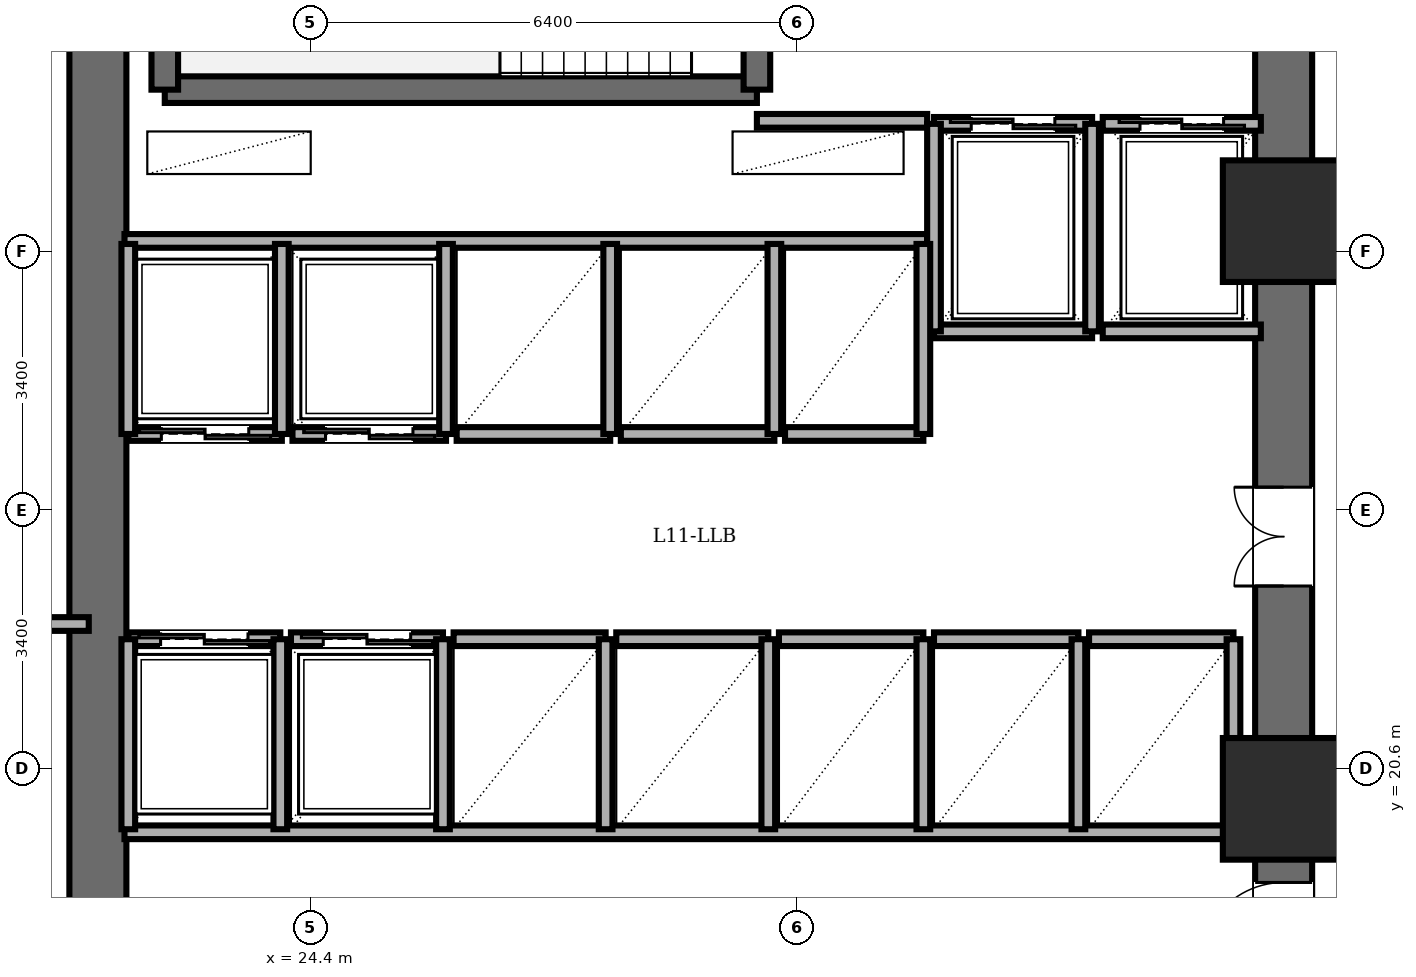
"""IFC4 building model, lengths in metres.
Left out: names, types, materials, properties, quantities, classifications, styles, units other than length and angle.
Written with IfcOpenShell. Run it as: python <this file> out.ifc"""

import sys

from ifc_helpers import new_model, si_unit, direction, frame, frame_2d, origin, origin_2d, place, context, subcontext, project, spatial, rectangle, extrude, element, fill, save


model = new_model("IFC4")
c1 = context("Model", 3, precision=1e-05, world=origin(), true_north=direction((0.0, 1.0)))
c2 = subcontext(c1, "Body", "Model", "MODEL_VIEW")
j1 = project(units=[si_unit("LENGTHUNIT", "METRE"), si_unit("PLANEANGLEUNIT", "RADIAN")], contexts=[c1])
p1 = place(None, origin())
s1 = spatial("IfcSite", under=j1, at=p1, CompositionType="ELEMENT")
p2 = place(p1, origin())
s2 = spatial("IfcBuilding", under=s1, at=p2, CompositionType="ELEMENT")
p3 = place(p2, frame((0.0, 0.0, 43.2)))
s3 = spatial("IfcBuildingStorey", under=s2, at=p3, CompositionType="ELEMENT", Elevation=43.2)
for number, where, z_axis, x_axis in (
    (1, (37.2, 20.2, 0.0), (0.0, 0.0, 1.0), (1.0, 0.0, 0.0)),
    (2, (37.2, 27.8, 0.0), (0.0, 0.0, 1.0), (1.0, 0.0, 0.0)),
):
    element("IfcColumn", number, at=place(p3, frame(where, z_axis=z_axis, x_axis=x_axis)), inside=s3, PredefinedType="COLUMN", context=c2, shape_type="SweptSolid", body=[
        extrude(rectangle(XDim=1.6, YDim=1.6, at=origin_2d()), origin(), (0.0, 0.0, 1.0), 3.6),
    ])
p4 = place(p3, frame((21.6, 14.4, 0.0), z_axis=(0.0, 0.0, 1.0), x_axis=(0.0, 1.0, 0.0)))
e3 = element("IfcWall", 3, at=p4, inside=s3, PredefinedType="SHEAR", context=c2, shape_type="SweptSolid", body=[
    extrude(rectangle(XDim=19.2, YDim=0.75, at=frame_2d((9.6, 0.0))), origin(), (0.0, 0.0, 1.0), 3.4),
])
p5 = place(p3, frame((37.2, 14.4, 0.0), z_axis=(0.0, 0.0, 1.0), x_axis=(0.0, 1.0, 0.0)))
e4 = element("IfcWall", 4, at=p5, inside=s3, PredefinedType="SHEAR", context=c2, shape_type="SweptSolid", body=[
    extrude(rectangle(XDim=19.2, YDim=0.75, at=frame_2d((9.6, 0.0))), origin(), (0.0, 0.0, 1.0), 3.4),
])
p6 = place(p5, frame((15.8, 0.0, 0.0)))
e5 = element("IfcOpeningElement", 5, at=p6, cuts=e4, PredefinedType="OPENING", context=c2, shape_type="SweptSolid", body=[
    extrude(rectangle(XDim=1.15, YDim=2.15, at=frame_2d((0.575, 1.075))), frame((0.0, 0.385, 0.0), z_axis=(0.0, -1.0, 0.0), x_axis=(1.0, 0.0, 0.0)), (0.0, 0.0, 1.0), 0.77),
])
p7 = place(p5, frame((3.6, 0.0, 0.0)))
e6 = element("IfcOpeningElement", 6, at=p7, cuts=e4, PredefinedType="OPENING", context=c2, shape_type="SweptSolid", body=[
    extrude(rectangle(XDim=1.1, YDim=2.15, at=frame_2d((0.55, 1.075))), frame((0.0, 0.385, 0.0), z_axis=(0.0, -1.0, 0.0), x_axis=(1.0, 0.0, 0.0)), (0.0, 0.0, 1.0), 0.77),
])
p8 = place(p5, frame((8.6, 0.0, 0.0)))
e7 = element("IfcOpeningElement", 7, at=p8, cuts=e4, PredefinedType="OPENING", context=c2, shape_type="SweptSolid", body=[
    extrude(rectangle(XDim=1.3, YDim=2.2, at=frame_2d((0.65, 1.1))), frame((0.0, 0.385, 0.0), z_axis=(0.0, -1.0, 0.0), x_axis=(1.0, 0.0, 0.0)), (0.0, 0.0, 1.0), 0.77),
])
p9 = place(p3, frame((22.48, 29.53, 0.0), z_axis=(0.0, 0.0, 1.0), x_axis=(1.0, 0.0, 0.0)))
e8 = element("IfcWall", 8, at=p9, inside=s3, PredefinedType="SOLIDWALL", context=c2, shape_type="SweptSolid", body=[
    extrude(rectangle(XDim=7.79, YDim=0.35, at=frame_2d((3.895, 0.0))), origin(), (0.0, 0.0, 1.0), 3.4),
])
p10 = place(p3, frame((22.48, 29.53, 0.0), z_axis=(0.0, 0.0, 1.0), x_axis=(0.0, 1.0, 0.0)))
e9 = element("IfcWall", 9, at=p10, inside=s3, PredefinedType="SOLIDWALL", context=c2, shape_type="SweptSolid", body=[
    extrude(rectangle(XDim=3.58, YDim=0.35, at=frame_2d((1.79, 0.0))), origin(), (0.0, 0.0, 1.0), 3.4),
])
p11 = place(p3, frame((30.27, 29.53, 0.0), z_axis=(0.0, 0.0, 1.0), x_axis=(0.0, 1.0, 0.0)))
e10 = element("IfcWall", 10, at=p11, inside=s3, PredefinedType="SOLIDWALL", context=c2, shape_type="SweptSolid", body=[
    extrude(rectangle(XDim=3.58, YDim=0.35, at=frame_2d((1.79, 0.0))), origin(), (0.0, 0.0, 1.0), 3.4),
])
p12 = place(p11, frame((1.25, 0.0, 0.0)))
e11 = element("IfcOpeningElement", 11, at=p12, cuts=e10, PredefinedType="OPENING", context=c2, shape_type="SweptSolid", body=[
    extrude(rectangle(XDim=1.1, YDim=2.15, at=frame_2d((0.55, 1.075))), frame((0.0, 0.185, 0.0), z_axis=(0.0, -1.0, 0.0), x_axis=(1.0, 0.0, 0.0)), (0.0, 0.0, 1.0), 0.37),
])
p13 = place(p3, frame((30.27, 29.12, 0.0), z_axis=(0.0, 0.0, 1.0), x_axis=(1.0, 0.0, 0.0)))
e12 = element("IfcWall", 12, at=p13, inside=s3, PredefinedType="PARTITIONING", context=c2, shape_type="SweptSolid", body=[
    extrude(rectangle(XDim=2.24, YDim=0.18, at=frame_2d((1.12, 0.0))), origin(), (0.0, 0.0, 1.0), 3.4),
])
p14 = place(p3, frame((21.95, 27.54, 0.0), z_axis=(0.0, 0.0, 1.0), x_axis=(1.0, 0.0, 0.0)))
e13 = element("IfcWall", 13, at=p14, inside=s3, PredefinedType="PARTITIONING", context=c2, shape_type="SweptSolid", body=[
    extrude(rectangle(XDim=10.56, YDim=0.18, at=frame_2d((5.28, 0.0))), origin(), (0.0, 0.0, 1.0), 3.4),
])
p15 = place(p3, frame((21.95, 19.76, 0.0), z_axis=(0.0, 0.0, 1.0), x_axis=(1.0, 0.0, 0.0)))
e14 = element("IfcWall", 14, at=p15, inside=s3, PredefinedType="PARTITIONING", context=c2, shape_type="SweptSolid", body=[
    extrude(rectangle(XDim=14.87, YDim=0.18, at=frame_2d((7.435, 0.0))), origin(), (0.0, 0.0, 1.0), 3.4),
])
p16 = place(p3, frame((32.6, 29.08, 0.0), z_axis=(0.0, 0.0, 1.0), x_axis=(1.0, 0.0, 0.0)))
e15 = element("IfcWall", 15, at=p16, inside=s3, PredefinedType="PARTITIONING", context=c2, shape_type="SweptSolid", body=[
    extrude(rectangle(XDim=2.08, YDim=0.18, at=frame_2d((1.04, 0.0))), origin(), (0.0, 0.0, 1.0), 3.4),
])
p17 = place(p16, frame((0.49, 0.0, 0.0)))
e16 = element("IfcOpeningElement", 16, at=p17, cuts=e15, PredefinedType="OPENING", context=c2, shape_type="SweptSolid", body=[
    extrude(rectangle(XDim=1.1, YDim=2.2, at=frame_2d((0.55, 1.1))), frame((0.0, 0.1, 0.0), z_axis=(0.0, -1.0, 0.0), x_axis=(1.0, 0.0, 0.0)), (0.0, 0.0, 1.0), 0.2),
])
p18 = place(p3, frame((34.68, 26.35, 0.0), z_axis=(0.0, 0.0, 1.0), x_axis=(-1.0, 0.0, 0.0)))
e17 = element("IfcWall", 17, at=p18, inside=s3, PredefinedType="PARTITIONING", context=c2, shape_type="SweptSolid", body=[
    extrude(rectangle(XDim=2.08, YDim=0.18, at=frame_2d((1.04, 0.0))), origin(), (0.0, 0.0, 1.0), 3.4),
])
for number, where, z_axis, x_axis in (
    (18, (34.68, 26.35, 0.0), (0.0, 0.0, 1.0), (0.0, 1.0, 0.0)),
    (19, (32.6, 29.08, 0.0), (0.0, 0.0, 1.0), (0.0, -1.0, 0.0)),
):
    element("IfcWall", number, at=place(p3, frame(where, z_axis=z_axis, x_axis=x_axis)), inside=s3, PredefinedType="PARTITIONING", context=c2, shape_type="SweptSolid", body=[
        extrude(rectangle(XDim=2.73, YDim=0.18, at=frame_2d((1.365, 0.0))), origin(), (0.0, 0.0, 1.0), 3.4),
    ])
p19 = place(p3, frame((34.82, 29.08, 0.0), z_axis=(0.0, 0.0, 1.0), x_axis=(1.0, 0.0, 0.0)))
e20 = element("IfcWall", 20, at=p19, inside=s3, PredefinedType="PARTITIONING", context=c2, shape_type="SweptSolid", body=[
    extrude(rectangle(XDim=2.08, YDim=0.18, at=frame_2d((1.04, 0.0))), origin(), (0.0, 0.0, 1.0), 3.4),
])
p20 = place(p19, frame((0.49, 0.0, 0.0)))
e21 = element("IfcOpeningElement", 21, at=p20, cuts=e20, PredefinedType="OPENING", context=c2, shape_type="SweptSolid", body=[
    extrude(rectangle(XDim=1.1, YDim=2.2, at=frame_2d((0.55, 1.1))), frame((0.0, 0.1, 0.0), z_axis=(0.0, -1.0, 0.0), x_axis=(1.0, 0.0, 0.0)), (0.0, 0.0, 1.0), 0.2),
])
p21 = place(p3, frame((36.9, 26.35, 0.0), z_axis=(0.0, 0.0, 1.0), x_axis=(-1.0, 0.0, 0.0)))
e22 = element("IfcWall", 22, at=p21, inside=s3, PredefinedType="PARTITIONING", context=c2, shape_type="SweptSolid", body=[
    extrude(rectangle(XDim=2.08, YDim=0.18, at=frame_2d((1.04, 0.0))), origin(), (0.0, 0.0, 1.0), 3.4),
])
p22 = place(p3, frame((24.02, 25.0, 0.0), z_axis=(0.0, 0.0, 1.0), x_axis=(-1.0, 0.0, 0.0)))
e23 = element("IfcWall", 23, at=p22, inside=s3, PredefinedType="PARTITIONING", context=c2, shape_type="SweptSolid", body=[
    extrude(rectangle(XDim=2.02, YDim=0.18, at=frame_2d((1.01, 0.0))), origin(), (0.0, 0.0, 1.0), 3.4),
])
p23 = place(p22, frame((0.435, 0.0, 0.0)))
e24 = element("IfcOpeningElement", 24, at=p23, cuts=e23, PredefinedType="OPENING", context=c2, shape_type="SweptSolid", body=[
    extrude(rectangle(XDim=1.15, YDim=2.2, at=frame_2d((0.575, 1.1))), frame((0.0, 0.1, 0.0), z_axis=(0.0, -1.0, 0.0), x_axis=(1.0, 0.0, 0.0)), (0.0, 0.0, 1.0), 0.2),
])
for number, where, z_axis, x_axis in (
    (25, (24.02, 25.0, 0.0), (0.0, 0.0, 1.0), (0.0, 1.0, 0.0)),
    (26, (22.0, 27.5, 0.0), (0.0, 0.0, 1.0), (0.0, -1.0, 0.0)),
):
    element("IfcWall", number, at=place(p3, frame(where, z_axis=z_axis, x_axis=x_axis)), inside=s3, PredefinedType="PARTITIONING", context=c2, shape_type="SweptSolid", body=[
        extrude(rectangle(XDim=2.5, YDim=0.18, at=frame_2d((1.25, 0.0))), origin(), (0.0, 0.0, 1.0), 3.4),
    ])
p24 = place(p3, frame((26.18, 25.0, 0.0), z_axis=(0.0, 0.0, 1.0), x_axis=(-1.0, 0.0, 0.0)))
e27 = element("IfcWall", 27, at=p24, inside=s3, PredefinedType="PARTITIONING", context=c2, shape_type="SweptSolid", body=[
    extrude(rectangle(XDim=2.02, YDim=0.18, at=frame_2d((1.01, 0.0))), origin(), (0.0, 0.0, 1.0), 3.4),
])
p25 = place(p24, frame((0.435, 0.0, 0.0)))
e28 = element("IfcOpeningElement", 28, at=p25, cuts=e27, PredefinedType="OPENING", context=c2, shape_type="SweptSolid", body=[
    extrude(rectangle(XDim=1.15, YDim=2.2, at=frame_2d((0.575, 1.1))), frame((0.0, 0.1, 0.0), z_axis=(0.0, -1.0, 0.0), x_axis=(1.0, 0.0, 0.0)), (0.0, 0.0, 1.0), 0.2),
])
p26 = place(p3, frame((26.18, 25.0, 0.0), z_axis=(0.0, 0.0, 1.0), x_axis=(0.0, 1.0, 0.0)))
e29 = element("IfcWall", 29, at=p26, inside=s3, PredefinedType="PARTITIONING", context=c2, shape_type="SweptSolid", body=[
    extrude(rectangle(XDim=2.5, YDim=0.18, at=frame_2d((1.25, 0.0))), origin(), (0.0, 0.0, 1.0), 3.4),
])
p27 = place(p3, frame((22.0, 22.3, 0.0), z_axis=(0.0, 0.0, 1.0), x_axis=(1.0, 0.0, 0.0)))
e30 = element("IfcWall", 30, at=p27, inside=s3, PredefinedType="PARTITIONING", context=c2, shape_type="SweptSolid", body=[
    extrude(rectangle(XDim=2.0, YDim=0.18, at=frame_2d((1.0, 0.0))), origin(), (0.0, 0.0, 1.0), 3.4),
])
p28 = place(p27, frame((0.425, 0.0, 0.0)))
e31 = element("IfcOpeningElement", 31, at=p28, cuts=e30, PredefinedType="OPENING", context=c2, shape_type="SweptSolid", body=[
    extrude(rectangle(XDim=1.15, YDim=2.2, at=frame_2d((0.575, 1.1))), frame((0.0, 0.1, 0.0), z_axis=(0.0, -1.0, 0.0), x_axis=(1.0, 0.0, 0.0)), (0.0, 0.0, 1.0), 0.2),
])
for number, where, z_axis, x_axis in (
    (32, (24.0, 19.8, 0.0), (0.0, 0.0, 1.0), (0.0, 1.0, 0.0)),
    (33, (22.0, 22.3, 0.0), (0.0, 0.0, 1.0), (0.0, -1.0, 0.0)),
):
    element("IfcWall", number, at=place(p3, frame(where, z_axis=z_axis, x_axis=x_axis)), inside=s3, PredefinedType="PARTITIONING", context=c2, shape_type="SweptSolid", body=[
        extrude(rectangle(XDim=2.5, YDim=0.18, at=frame_2d((1.25, 0.0))), origin(), (0.0, 0.0, 1.0), 3.4),
    ])
p29 = place(p3, frame((24.14, 22.3, 0.0), z_axis=(0.0, 0.0, 1.0), x_axis=(1.0, 0.0, 0.0)))
e34 = element("IfcWall", 34, at=p29, inside=s3, PredefinedType="PARTITIONING", context=c2, shape_type="SweptSolid", body=[
    extrude(rectangle(XDim=2.0, YDim=0.18, at=frame_2d((1.0, 0.0))), origin(), (0.0, 0.0, 1.0), 3.4),
])
p30 = place(p29, frame((0.425, 0.0, 0.0)))
e35 = element("IfcOpeningElement", 35, at=p30, cuts=e34, PredefinedType="OPENING", context=c2, shape_type="SweptSolid", body=[
    extrude(rectangle(XDim=1.15, YDim=2.2, at=frame_2d((0.575, 1.1))), frame((0.0, 0.1, 0.0), z_axis=(0.0, -1.0, 0.0), x_axis=(1.0, 0.0, 0.0)), (0.0, 0.0, 1.0), 0.2),
])
p31 = place(p3, frame((26.14, 19.8, 0.0), z_axis=(0.0, 0.0, 1.0), x_axis=(0.0, 1.0, 0.0)))
e36 = element("IfcWall", 36, at=p31, inside=s3, PredefinedType="PARTITIONING", context=c2, shape_type="SweptSolid", body=[
    extrude(rectangle(XDim=2.5, YDim=0.18, at=frame_2d((1.25, 0.0))), origin(), (0.0, 0.0, 1.0), 3.4),
])
p32 = place(p3, frame((28.34, 25.0, 0.0), z_axis=(0.0, 0.0, 1.0), x_axis=(-1.0, 0.0, 0.0)))
e37 = element("IfcWall", 37, at=p32, inside=s3, PredefinedType="PARTITIONING", context=c2, shape_type="SweptSolid", body=[
    extrude(rectangle(XDim=2.02, YDim=0.18, at=frame_2d((1.01, 0.0))), origin(), (0.0, 0.0, 1.0), 3.4),
])
p33 = place(p3, frame((28.34, 25.0, 0.0), z_axis=(0.0, 0.0, 1.0), x_axis=(0.0, 1.0, 0.0)))
e38 = element("IfcWall", 38, at=p33, inside=s3, PredefinedType="PARTITIONING", context=c2, shape_type="SweptSolid", body=[
    extrude(rectangle(XDim=2.5, YDim=0.18, at=frame_2d((1.25, 0.0))), origin(), (0.0, 0.0, 1.0), 3.4),
])
p34 = place(p3, frame((30.5, 25.0, 0.0), z_axis=(0.0, 0.0, 1.0), x_axis=(-1.0, 0.0, 0.0)))
e39 = element("IfcWall", 39, at=p34, inside=s3, PredefinedType="PARTITIONING", context=c2, shape_type="SweptSolid", body=[
    extrude(rectangle(XDim=2.02, YDim=0.18, at=frame_2d((1.01, 0.0))), origin(), (0.0, 0.0, 1.0), 3.4),
])
p35 = place(p3, frame((30.5, 25.0, 0.0), z_axis=(0.0, 0.0, 1.0), x_axis=(0.0, 1.0, 0.0)))
e40 = element("IfcWall", 40, at=p35, inside=s3, PredefinedType="PARTITIONING", context=c2, shape_type="SweptSolid", body=[
    extrude(rectangle(XDim=2.5, YDim=0.18, at=frame_2d((1.25, 0.0))), origin(), (0.0, 0.0, 1.0), 3.4),
])
p36 = place(p3, frame((26.28, 22.3, 0.0), z_axis=(0.0, 0.0, 1.0), x_axis=(1.0, 0.0, 0.0)))
e41 = element("IfcWall", 41, at=p36, inside=s3, PredefinedType="PARTITIONING", context=c2, shape_type="SweptSolid", body=[
    extrude(rectangle(XDim=2.0, YDim=0.18, at=frame_2d((1.0, 0.0))), origin(), (0.0, 0.0, 1.0), 3.4),
])
p37 = place(p3, frame((28.28, 19.8, 0.0), z_axis=(0.0, 0.0, 1.0), x_axis=(0.0, 1.0, 0.0)))
e42 = element("IfcWall", 42, at=p37, inside=s3, PredefinedType="PARTITIONING", context=c2, shape_type="SweptSolid", body=[
    extrude(rectangle(XDim=2.5, YDim=0.18, at=frame_2d((1.25, 0.0))), origin(), (0.0, 0.0, 1.0), 3.4),
])
p38 = place(p3, frame((28.42, 22.3, 0.0), z_axis=(0.0, 0.0, 1.0), x_axis=(1.0, 0.0, 0.0)))
e43 = element("IfcWall", 43, at=p38, inside=s3, PredefinedType="PARTITIONING", context=c2, shape_type="SweptSolid", body=[
    extrude(rectangle(XDim=2.0, YDim=0.18, at=frame_2d((1.0, 0.0))), origin(), (0.0, 0.0, 1.0), 3.4),
])
p39 = place(p3, frame((30.42, 19.8, 0.0), z_axis=(0.0, 0.0, 1.0), x_axis=(0.0, 1.0, 0.0)))
e44 = element("IfcWall", 44, at=p39, inside=s3, PredefinedType="PARTITIONING", context=c2, shape_type="SweptSolid", body=[
    extrude(rectangle(XDim=2.5, YDim=0.18, at=frame_2d((1.25, 0.0))), origin(), (0.0, 0.0, 1.0), 3.4),
])
p40 = place(p3, frame((32.46, 25.0, 0.0), z_axis=(0.0, 0.0, 1.0), x_axis=(-1.0, 0.0, 0.0)))
e45 = element("IfcWall", 45, at=p40, inside=s3, PredefinedType="PARTITIONING", context=c2, shape_type="SweptSolid", body=[
    extrude(rectangle(XDim=1.82, YDim=0.18, at=frame_2d((0.91, 0.0))), origin(), (0.0, 0.0, 1.0), 3.4),
])
p41 = place(p3, frame((32.46, 25.0, 0.0), z_axis=(0.0, 0.0, 1.0), x_axis=(0.0, 1.0, 0.0)))
e46 = element("IfcWall", 46, at=p41, inside=s3, PredefinedType="PARTITIONING", context=c2, shape_type="SweptSolid", body=[
    extrude(rectangle(XDim=2.5, YDim=0.18, at=frame_2d((1.25, 0.0))), origin(), (0.0, 0.0, 1.0), 3.4),
])
p42 = place(p3, frame((30.56, 22.3, 0.0), z_axis=(0.0, 0.0, 1.0), x_axis=(1.0, 0.0, 0.0)))
e47 = element("IfcWall", 47, at=p42, inside=s3, PredefinedType="PARTITIONING", context=c2, shape_type="SweptSolid", body=[
    extrude(rectangle(XDim=1.9, YDim=0.18, at=frame_2d((0.95, 0.0))), origin(), (0.0, 0.0, 1.0), 3.4),
])
p43 = place(p3, frame((32.46, 19.8, 0.0), z_axis=(0.0, 0.0, 1.0), x_axis=(0.0, 1.0, 0.0)))
e48 = element("IfcWall", 48, at=p43, inside=s3, PredefinedType="PARTITIONING", context=c2, shape_type="SweptSolid", body=[
    extrude(rectangle(XDim=2.5, YDim=0.18, at=frame_2d((1.25, 0.0))), origin(), (0.0, 0.0, 1.0), 3.4),
])
p44 = place(p3, frame((32.6, 22.3, 0.0), z_axis=(0.0, 0.0, 1.0), x_axis=(1.0, 0.0, 0.0)))
e49 = element("IfcWall", 49, at=p44, inside=s3, PredefinedType="PARTITIONING", context=c2, shape_type="SweptSolid", body=[
    extrude(rectangle(XDim=1.9, YDim=0.18, at=frame_2d((0.95, 0.0))), origin(), (0.0, 0.0, 1.0), 3.4),
])
p45 = place(p3, frame((34.5, 19.8, 0.0), z_axis=(0.0, 0.0, 1.0), x_axis=(0.0, 1.0, 0.0)))
e50 = element("IfcWall", 50, at=p45, inside=s3, PredefinedType="PARTITIONING", context=c2, shape_type="SweptSolid", body=[
    extrude(rectangle(XDim=2.5, YDim=0.18, at=frame_2d((1.25, 0.0))), origin(), (0.0, 0.0, 1.0), 3.4),
])
p46 = place(p3, frame((34.64, 22.3, 0.0), z_axis=(0.0, 0.0, 1.0), x_axis=(1.0, 0.0, 0.0)))
e51 = element("IfcWall", 51, at=p46, inside=s3, PredefinedType="PARTITIONING", context=c2, shape_type="SweptSolid", body=[
    extrude(rectangle(XDim=1.9, YDim=0.18, at=frame_2d((0.95, 0.0))), origin(), (0.0, 0.0, 1.0), 3.4),
])
p47 = place(p3, frame((36.54, 19.8, 0.0), z_axis=(0.0, 0.0, 1.0), x_axis=(0.0, 1.0, 0.0)))
e52 = element("IfcWall", 52, at=p47, inside=s3, PredefinedType="PARTITIONING", context=c2, shape_type="SweptSolid", body=[
    extrude(rectangle(XDim=2.5, YDim=0.18, at=frame_2d((1.25, 0.0))), origin(), (0.0, 0.0, 1.0), 3.4),
])
p48 = place(p3, frame((3.4, 22.5, 0.0), z_axis=(0.0, 0.0, 1.0), x_axis=(1.0, 0.0, 0.0)))
e53 = element("IfcWall", 53, at=p48, inside=s3, PredefinedType="PARTITIONING", context=c2, shape_type="SweptSolid", body=[
    extrude(rectangle(XDim=18.08, YDim=0.18, at=frame_2d((9.04, 0.0))), origin(), (0.0, 0.0, 1.0), 3.4),
])
p49 = place(p7, origin())
e54 = element("IfcDoor", 54, at=p49, inside=s3, OperationType="SINGLE_SWING_LEFT", PredefinedType="DOOR", context=c2, shape_type="SweptSolid", body=[
    extrude(rectangle(XDim=1.1, YDim=2.15, at=frame_2d((0.55, 1.075))), frame((0.0, 0.025, 0.0), z_axis=(0.0, -1.0, 0.0), x_axis=(1.0, 0.0, 0.0)), (0.0, 0.0, 1.0), 0.05),
])
fill(e6, e54)
p50 = place(p17, origin())
e55 = element("IfcDoor", 55, at=p50, inside=s3, OperationType="DOUBLE_DOOR_SLIDING", PredefinedType="DOOR", context=c2, shape_type="SweptSolid", body=[
    extrude(rectangle(XDim=1.1, YDim=2.2, at=frame_2d((0.55, 1.1))), frame((0.0, 0.025, 0.0), z_axis=(0.0, -1.0, 0.0), x_axis=(1.0, 0.0, 0.0)), (0.0, 0.0, 1.0), 0.05),
])
fill(e16, e55)
p51 = place(p20, origin())
e56 = element("IfcDoor", 56, at=p51, inside=s3, OperationType="DOUBLE_DOOR_SLIDING", PredefinedType="DOOR", context=c2, shape_type="SweptSolid", body=[
    extrude(rectangle(XDim=1.1, YDim=2.2, at=frame_2d((0.55, 1.1))), frame((0.0, 0.025, 0.0), z_axis=(0.0, -1.0, 0.0), x_axis=(1.0, 0.0, 0.0)), (0.0, 0.0, 1.0), 0.05),
])
fill(e21, e56)
p52 = place(p23, origin())
e57 = element("IfcDoor", 57, at=p52, inside=s3, OperationType="DOUBLE_DOOR_SLIDING", PredefinedType="DOOR", context=c2, shape_type="SweptSolid", body=[
    extrude(rectangle(XDim=1.15, YDim=2.2, at=frame_2d((0.575, 1.1))), frame((0.0, 0.025, 0.0), z_axis=(0.0, -1.0, 0.0), x_axis=(1.0, 0.0, 0.0)), (0.0, 0.0, 1.0), 0.05),
])
fill(e24, e57)
p53 = place(p25, origin())
e58 = element("IfcDoor", 58, at=p53, inside=s3, OperationType="DOUBLE_DOOR_SLIDING", PredefinedType="DOOR", context=c2, shape_type="SweptSolid", body=[
    extrude(rectangle(XDim=1.15, YDim=2.2, at=frame_2d((0.575, 1.1))), frame((0.0, 0.025, 0.0), z_axis=(0.0, -1.0, 0.0), x_axis=(1.0, 0.0, 0.0)), (0.0, 0.0, 1.0), 0.05),
])
fill(e28, e58)
p54 = place(p28, origin())
e59 = element("IfcDoor", 59, at=p54, inside=s3, OperationType="DOUBLE_DOOR_SLIDING", PredefinedType="DOOR", context=c2, shape_type="SweptSolid", body=[
    extrude(rectangle(XDim=1.15, YDim=2.2, at=frame_2d((0.575, 1.1))), frame((0.0, 0.025, 0.0), z_axis=(0.0, -1.0, 0.0), x_axis=(1.0, 0.0, 0.0)), (0.0, 0.0, 1.0), 0.05),
])
fill(e31, e59)
p55 = place(p30, origin())
e60 = element("IfcDoor", 60, at=p55, inside=s3, OperationType="DOUBLE_DOOR_SLIDING", PredefinedType="DOOR", context=c2, shape_type="SweptSolid", body=[
    extrude(rectangle(XDim=1.15, YDim=2.2, at=frame_2d((0.575, 1.1))), frame((0.0, 0.025, 0.0), z_axis=(0.0, -1.0, 0.0), x_axis=(1.0, 0.0, 0.0)), (0.0, 0.0, 1.0), 0.05),
])
fill(e35, e60)
p56 = place(p8, origin())
e61 = element("IfcDoor", 61, at=p56, inside=s3, OperationType="DOUBLE_DOOR_SINGLE_SWING", PredefinedType="DOOR", context=c2, shape_type="SweptSolid", body=[
    extrude(rectangle(XDim=1.3, YDim=2.2, at=frame_2d((0.65, 1.1))), frame((0.0, 0.025, 0.0), z_axis=(0.0, -1.0, 0.0), x_axis=(1.0, 0.0, 0.0)), (0.0, 0.0, 1.0), 0.05),
])
fill(e7, e61)
save(model, sys.argv[1])
